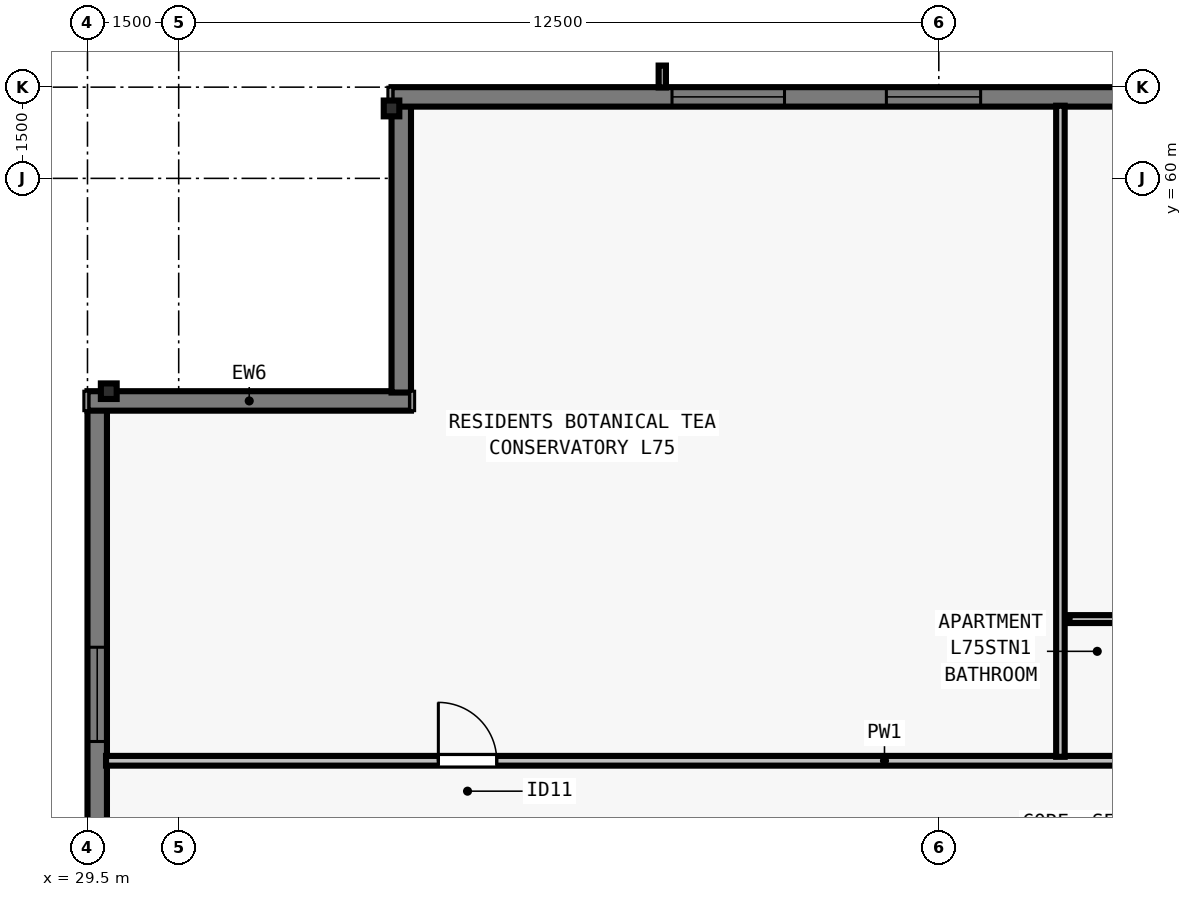
"""IFC4 building model, lengths in metres.
Left out: names, types, materials, properties, quantities, classifications, styles, units other than length and angle.
Written with IfcOpenShell. Run it as: python <this file> out.ifc"""

import sys

from ifc_helpers import new_model, si_unit, direction, frame, frame_2d, origin, origin_2d, place, context, subcontext, project, spatial, rectangle, i_section, extrude, element, fill, save


model = new_model("IFC4")
c1 = context("Model", 3, precision=1e-05, world=origin(), true_north=direction((0.0, 1.0)))
c2 = subcontext(c1, "Body", "Model", "MODEL_VIEW")
j1 = project(units=[si_unit("LENGTHUNIT", "METRE"), si_unit("PLANEANGLEUNIT", "RADIAN")], contexts=[c1])
p1 = place(None, origin())
s1 = spatial("IfcSite", under=j1, at=p1, CompositionType="ELEMENT")
p2 = place(p1, origin())
s2 = spatial("IfcBuilding", under=s1, at=p2, CompositionType="ELEMENT")
p3 = place(p2, frame((0.0, 0.0, 272.5)))
s3 = spatial("IfcBuildingStorey", under=s2, at=p3, CompositionType="ELEMENT", Elevation=272.5)
for number, where, z_axis, x_axis in (
    (1, (34.5, 61.15, 0.0), (0.0, 0.0, 1.0), (1.0, 0.0, 0.0)),
    (2, (29.85, 56.5, 0.0), (0.0, 0.0, 1.0), (0.0, 1.0, 0.0)),
):
    element("IfcColumn", number, at=place(p3, frame(where, z_axis=z_axis, x_axis=x_axis)), inside=s3, PredefinedType="COLUMN", context=c2, shape_type="SweptSolid", body=[
        extrude(i_section(OverallWidth=0.256, OverallDepth=0.26, WebThickness=0.01, FlangeThickness=0.017, FilletRadius=0.013, at=origin_2d()), origin(), (0.0, 0.0, 1.0), 3.5),
    ])
p4 = place(p3, frame((29.66, 21.5, 0.0), z_axis=(0.0, 0.0, 1.0), x_axis=(0.0, 1.0, 0.0)))
e3 = element("IfcWall", 3, at=p4, inside=s3, PredefinedType="SOLIDWALL", context=c2, shape_type="SweptSolid", body=[
    extrude(rectangle(XDim=34.702, YDim=0.32, at=frame_2d((17.351, 0.0))), origin(), (0.0, 0.0, 1.0), 3.24),
])
p5 = place(p4, frame((6.888, 0.0, 0.8)))
e4 = element("IfcOpeningElement", 4, at=p5, cuts=e3, PredefinedType="OPENING", context=c2, shape_type="SweptSolid", body=[
    extrude(rectangle(XDim=1.55, YDim=1.628, at=frame_2d((0.775, 0.814))), frame((0.0, 0.17, 0.0), z_axis=(0.0, -1.0, 0.0), x_axis=(1.0, 0.0, 0.0)), (0.0, 0.0, 1.0), 0.34),
])
p6 = place(p4, frame((10.113, 0.0, 0.8)))
e5 = element("IfcOpeningElement", 5, at=p6, cuts=e3, PredefinedType="OPENING", context=c2, shape_type="SweptSolid", body=[
    extrude(rectangle(XDim=1.85, YDim=1.628, at=frame_2d((0.925, 0.814))), frame((0.0, 0.17, 0.0), z_axis=(0.0, -1.0, 0.0), x_axis=(1.0, 0.0, 0.0)), (0.0, 0.0, 1.0), 0.34),
])
p7 = place(p4, frame((14.888, 0.0, 0.8)))
e6 = element("IfcOpeningElement", 6, at=p7, cuts=e3, PredefinedType="OPENING", context=c2, shape_type="SweptSolid", body=[
    extrude(rectangle(XDim=1.55, YDim=1.628, at=frame_2d((0.775, 0.814))), frame((0.0, 0.17, 0.0), z_axis=(0.0, -1.0, 0.0), x_axis=(1.0, 0.0, 0.0)), (0.0, 0.0, 1.0), 0.34),
])
p8 = place(p4, frame((18.114, 0.0, 0.8)))
e7 = element("IfcOpeningElement", 7, at=p8, cuts=e3, PredefinedType="OPENING", context=c2, shape_type="SweptSolid", body=[
    extrude(rectangle(XDim=1.85, YDim=1.628, at=frame_2d((0.925, 0.814))), frame((0.0, 0.17, 0.0), z_axis=(0.0, -1.0, 0.0), x_axis=(1.0, 0.0, 0.0)), (0.0, 0.0, 1.0), 0.34),
])
p9 = place(p4, frame((23.614, 0.0, 0.8)))
e8 = element("IfcOpeningElement", 8, at=p9, cuts=e3, PredefinedType="OPENING", context=c2, shape_type="SweptSolid", body=[
    extrude(rectangle(XDim=1.85, YDim=1.628, at=frame_2d((0.925, 0.814))), frame((0.0, 0.17, 0.0), z_axis=(0.0, -1.0, 0.0), x_axis=(1.0, 0.0, 0.0)), (0.0, 0.0, 1.0), 0.34),
])
p10 = place(p4, frame((29.24, 0.0, 0.8)))
e9 = element("IfcOpeningElement", 9, at=p10, cuts=e3, PredefinedType="OPENING", context=c2, shape_type="SweptSolid", body=[
    extrude(rectangle(XDim=1.55, YDim=1.628, at=frame_2d((0.775, 0.814))), frame((0.0, 0.17, 0.0), z_axis=(0.0, -1.0, 0.0), x_axis=(1.0, 0.0, 0.0)), (0.0, 0.0, 1.0), 0.34),
])
p11 = place(p3, frame((29.5, 56.34, 0.0), z_axis=(0.0, 0.0, 1.0), x_axis=(1.0, 0.0, 0.0)))
e10 = element("IfcWall", 10, at=p11, inside=s3, PredefinedType="SOLIDWALL", context=c2, shape_type="SweptSolid", body=[
    extrude(rectangle(XDim=5.32, YDim=0.32, at=frame_2d((2.66, 0.0))), origin(), (0.0, 0.0, 1.0), 3.24),
])
p12 = place(p3, frame((34.66, 56.478, 0.0), z_axis=(0.0, 0.0, 1.0), x_axis=(0.0, 1.0, 0.0)))
e11 = element("IfcWall", 11, at=p12, inside=s3, PredefinedType="SOLIDWALL", context=c2, shape_type="SweptSolid", body=[
    extrude(rectangle(XDim=4.724, YDim=0.32, at=frame_2d((2.362, 0.0))), origin(), (0.0, 0.0, 1.0), 3.24),
])
p13 = place(p3, frame((34.5, 61.34, 0.0), z_axis=(0.0, 0.0, 1.0), x_axis=(1.0, 0.0, 0.0)))
e12 = element("IfcWall", 12, at=p13, inside=s3, PredefinedType="SOLIDWALL", context=c2, shape_type="SweptSolid", body=[
    extrude(rectangle(XDim=34.702, YDim=0.32, at=frame_2d((17.351, 0.0))), origin(), (0.0, 0.0, 1.0), 3.24),
])
p14 = place(p13, frame((4.613, 0.0, 0.8)))
e13 = element("IfcOpeningElement", 13, at=p14, cuts=e12, PredefinedType="OPENING", context=c2, shape_type="SweptSolid", body=[
    extrude(rectangle(XDim=1.85, YDim=1.628, at=frame_2d((0.925, 0.814))), frame((0.0, 0.17, 0.0), z_axis=(0.0, -1.0, 0.0), x_axis=(1.0, 0.0, 0.0)), (0.0, 0.0, 1.0), 0.34),
])
p15 = place(p13, frame((8.138, 0.0, 0.8)))
e14 = element("IfcOpeningElement", 14, at=p15, cuts=e12, PredefinedType="OPENING", context=c2, shape_type="SweptSolid", body=[
    extrude(rectangle(XDim=1.55, YDim=1.628, at=frame_2d((0.775, 0.814))), frame((0.0, 0.17, 0.0), z_axis=(0.0, -1.0, 0.0), x_axis=(1.0, 0.0, 0.0)), (0.0, 0.0, 1.0), 0.34),
])
p16 = place(p13, frame((14.888, 0.0, 0.8)))
e15 = element("IfcOpeningElement", 15, at=p16, cuts=e12, PredefinedType="OPENING", context=c2, shape_type="SweptSolid", body=[
    extrude(rectangle(XDim=1.55, YDim=1.628, at=frame_2d((0.775, 0.814))), frame((0.0, 0.17, 0.0), z_axis=(0.0, -1.0, 0.0), x_axis=(1.0, 0.0, 0.0)), (0.0, 0.0, 1.0), 0.34),
])
p17 = place(p13, frame((19.364, 0.0, 0.8)))
e16 = element("IfcOpeningElement", 16, at=p17, cuts=e12, PredefinedType="OPENING", context=c2, shape_type="SweptSolid", body=[
    extrude(rectangle(XDim=1.85, YDim=1.628, at=frame_2d((0.925, 0.814))), frame((0.0, 0.17, 0.0), z_axis=(0.0, -1.0, 0.0), x_axis=(1.0, 0.0, 0.0)), (0.0, 0.0, 1.0), 0.34),
])
p18 = place(p13, frame((25.314, 0.0, 0.8)))
e17 = element("IfcOpeningElement", 17, at=p18, cuts=e12, PredefinedType="OPENING", context=c2, shape_type="SweptSolid", body=[
    extrude(rectangle(XDim=1.85, YDim=1.628, at=frame_2d((0.925, 0.814))), frame((0.0, 0.17, 0.0), z_axis=(0.0, -1.0, 0.0), x_axis=(1.0, 0.0, 0.0)), (0.0, 0.0, 1.0), 0.34),
])
p19 = place(p13, frame((28.389, 0.0, 0.8)))
e18 = element("IfcOpeningElement", 18, at=p19, cuts=e12, PredefinedType="OPENING", context=c2, shape_type="SweptSolid", body=[
    extrude(rectangle(XDim=1.55, YDim=1.628, at=frame_2d((0.775, 0.814))), frame((0.0, 0.17, 0.0), z_axis=(0.0, -1.0, 0.0), x_axis=(1.0, 0.0, 0.0)), (0.0, 0.0, 1.0), 0.34),
])
p20 = place(p3, frame((29.805, 50.423, 0.0), z_axis=(0.0, 0.0, 1.0), x_axis=(1.0, 0.0, 0.0)))
e19 = element("IfcWall", 19, at=p20, inside=s3, PredefinedType="PARTITIONING", context=c2, shape_type="SweptSolid", body=[
    extrude(rectangle(XDim=44.39, YDim=0.16, at=frame_2d((22.195, 0.0))), origin(), (0.0, 0.0, 1.0), 2.908),
])
p21 = place(p20, frame((5.465, 0.0, 0.0)))
e20 = element("IfcOpeningElement", 20, at=p21, cuts=e19, PredefinedType="OPENING", context=c2, shape_type="SweptSolid", body=[
    extrude(rectangle(XDim=0.96, YDim=2.12, at=frame_2d((0.48, 1.06))), frame((0.0, 0.09, 0.0), z_axis=(0.0, -1.0, 0.0), x_axis=(1.0, 0.0, 0.0)), (0.0, 0.0, 1.0), 0.18),
])
p22 = place(p20, frame((19.179, 0.0, 0.0)))
e21 = element("IfcOpeningElement", 21, at=p22, cuts=e19, PredefinedType="OPENING", context=c2, shape_type="SweptSolid", body=[
    extrude(rectangle(XDim=0.96, YDim=2.18, at=frame_2d((0.48, 1.09))), frame((0.0, 0.09, 0.0), z_axis=(0.0, -1.0, 0.0), x_axis=(1.0, 0.0, 0.0)), (0.0, 0.0, 1.0), 0.18),
])
p23 = place(p20, frame((26.106, 0.0, 0.0)))
e22 = element("IfcOpeningElement", 22, at=p23, cuts=e19, PredefinedType="OPENING", context=c2, shape_type="SweptSolid", body=[
    extrude(rectangle(XDim=0.96, YDim=2.18, at=frame_2d((0.48, 1.09))), frame((0.0, 0.09, 0.0), z_axis=(0.0, -1.0, 0.0), x_axis=(1.0, 0.0, 0.0)), (0.0, 0.0, 1.0), 0.18),
])
p24 = place(p20, frame((33.214, 0.0, 0.0)))
e23 = element("IfcOpeningElement", 23, at=p24, cuts=e19, PredefinedType="OPENING", context=c2, shape_type="SweptSolid", body=[
    extrude(rectangle(XDim=0.96, YDim=2.18, at=frame_2d((0.48, 1.09))), frame((0.0, 0.09, 0.0), z_axis=(0.0, -1.0, 0.0), x_axis=(1.0, 0.0, 0.0)), (0.0, 0.0, 1.0), 0.18),
])
p25 = place(p20, frame((40.501, 0.0, 0.0)))
e24 = element("IfcOpeningElement", 24, at=p25, cuts=e19, PredefinedType="OPENING", context=c2, shape_type="SweptSolid", body=[
    extrude(rectangle(XDim=0.96, YDim=2.18, at=frame_2d((0.48, 1.09))), frame((0.0, 0.09, 0.0), z_axis=(0.0, -1.0, 0.0), x_axis=(1.0, 0.0, 0.0)), (0.0, 0.0, 1.0), 0.18),
])
p26 = place(p3, frame((45.5, 50.488, 0.0), z_axis=(0.0, 0.0, 1.0), x_axis=(0.0, 1.0, 0.0)))
e25 = element("IfcWall", 25, at=p26, inside=s3, PredefinedType="PARTITIONING", context=c2, shape_type="SweptSolid", body=[
    extrude(rectangle(XDim=10.708, YDim=0.14, at=frame_2d((5.354, 0.0))), origin(), (0.0, 0.0, 1.0), 3.24),
])
p27 = place(p3, frame((45.65, 52.752, 0.0), z_axis=(0.0, 0.0, 1.0), x_axis=(1.0, 0.0, 0.0)))
e26 = element("IfcWall", 26, at=p27, inside=s3, PredefinedType="PLUMBINGWALL", context=c2, shape_type="SweptSolid", body=[
    extrude(rectangle(XDim=1.6, YDim=0.13, at=frame_2d((0.8, 0.0))), origin(), (0.0, 0.0, 1.0), 3.24),
])
p28 = place(p10, origin())
e27 = element("IfcWindow", 27, at=p28, inside=s3, PartitioningType="SINGLE_PANEL", PredefinedType="WINDOW", context=c2, shape_type="SweptSolid", body=[
    extrude(rectangle(XDim=1.55, YDim=1.628, at=frame_2d((0.775, 0.814))), frame((0.0, -0.05, 0.0), z_axis=(0.0, -1.0, 0.0), x_axis=(1.0, 0.0, 0.0)), (0.0, 0.0, 1.0), 0.06),
])
fill(e9, e27)
p29 = place(p14, origin())
e28 = element("IfcWindow", 28, at=p29, inside=s3, PartitioningType="SINGLE_PANEL", PredefinedType="WINDOW", context=c2, shape_type="SweptSolid", body=[
    extrude(rectangle(XDim=1.85, YDim=1.628, at=frame_2d((0.925, 0.814))), frame((0.0, -0.05, 0.0), z_axis=(0.0, -1.0, 0.0), x_axis=(1.0, 0.0, 0.0)), (0.0, 0.0, 1.0), 0.06),
])
fill(e13, e28)
p30 = place(p15, origin())
e29 = element("IfcWindow", 29, at=p30, inside=s3, PartitioningType="SINGLE_PANEL", PredefinedType="WINDOW", context=c2, shape_type="SweptSolid", body=[
    extrude(rectangle(XDim=1.55, YDim=1.628, at=frame_2d((0.775, 0.814))), frame((0.0, -0.05, 0.0), z_axis=(0.0, -1.0, 0.0), x_axis=(1.0, 0.0, 0.0)), (0.0, 0.0, 1.0), 0.06),
])
fill(e14, e29)
p31 = place(p21, origin())
e30 = element("IfcDoor", 30, at=p31, inside=s3, OperationType="SINGLE_SWING_LEFT", PredefinedType="DOOR", context=c2, shape_type="SweptSolid", body=[
    extrude(rectangle(XDim=0.96, YDim=2.12, at=frame_2d((0.48, 1.06))), frame((0.0, 0.025, 0.0), z_axis=(0.0, -1.0, 0.0), x_axis=(1.0, 0.0, 0.0)), (0.0, 0.0, 1.0), 0.05),
])
fill(e20, e30)
save(model, sys.argv[1])
